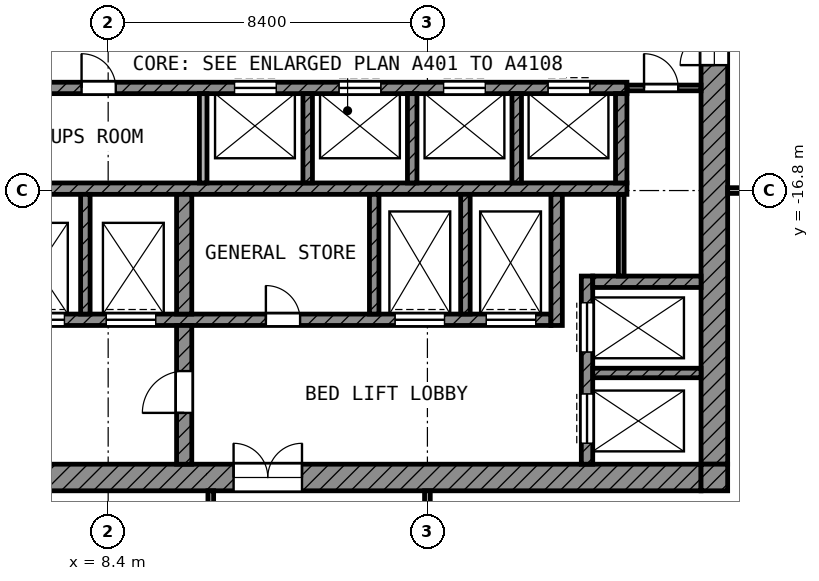
"""IFC4 building model, lengths in metres.
Left out: names, types, materials, properties, quantities, classifications, styles, units other than length and angle.
Written with IfcOpenShell. Run it as: python <this file> out.ifc"""

import sys

from ifc_helpers import new_model, si_unit, direction, frame, frame_2d, origin, place, context, subcontext, project, spatial, rectangle, extrude, element, fill, save


model = new_model("IFC4")
c1 = context("Model", 3, precision=1e-05, world=origin(), true_north=direction((0.0, 1.0)))
c2 = subcontext(c1, "Body", "Model", "MODEL_VIEW")
j1 = project(units=[si_unit("LENGTHUNIT", "METRE"), si_unit("PLANEANGLEUNIT", "RADIAN")], contexts=[c1])
p1 = place(None, origin())
s1 = spatial("IfcSite", under=j1, at=p1, CompositionType="ELEMENT")
p2 = place(p1, origin())
s2 = spatial("IfcBuilding", under=s1, at=p2, CompositionType="ELEMENT")
p3 = place(p2, frame((0.0, 0.0, 294.4)))
s3 = spatial("IfcBuildingStorey", under=s2, at=p3, CompositionType="ELEMENT", Elevation=294.4)
p4 = place(p3, frame((24.35, -24.0, 0.0), z_axis=(0.0, 0.0, 1.0), x_axis=(0.0, 1.0, 0.0)))
e1 = element("IfcWall", 1, at=p4, inside=s3, PredefinedType="SHEAR", context=c2, shape_type="SweptSolid", body=[
    extrude(rectangle(XDim=18.6, YDim=0.7, at=frame_2d((9.3, 0.0))), origin(), (0.0, 0.0, 1.0), 3.6),
])
p5 = place(p4, frame((10.5, 0.0, 0.0)))
e2 = element("IfcOpeningElement", 2, at=p5, cuts=e1, PredefinedType="OPENING", context=c2, shape_type="SweptSolid", body=[
    extrude(rectangle(XDim=1.8, YDim=2.1, at=frame_2d((0.9, 1.05))), frame((0.0, 0.36, 0.0), z_axis=(0.0, -1.0, 0.0), x_axis=(1.0, 0.0, 0.0)), (0.0, 0.0, 1.0), 0.72),
])
p6 = place(p3, frame((5.4, -24.35, 0.0), z_axis=(0.0, 0.0, 1.0), x_axis=(1.0, 0.0, 0.0)))
e3 = element("IfcWall", 3, at=p6, inside=s3, PredefinedType="SHEAR", context=c2, shape_type="SweptSolid", body=[
    extrude(rectangle(XDim=18.6, YDim=0.7, at=frame_2d((9.3, 0.0))), origin(), (0.0, 0.0, 1.0), 3.6),
])
p7 = place(p6, frame((6.3, 0.0, 0.0)))
e4 = element("IfcOpeningElement", 4, at=p7, cuts=e3, PredefinedType="OPENING", context=c2, shape_type="SweptSolid", body=[
    extrude(rectangle(XDim=1.8, YDim=2.1, at=frame_2d((0.9, 1.05))), frame((0.0, 0.36, 0.0), z_axis=(0.0, -1.0, 0.0), x_axis=(1.0, 0.0, 0.0)), (0.0, 0.0, 1.0), 0.72),
])
p8 = place(p3, frame((24.35, -24.7, 0.0), z_axis=(0.0, 0.0, 1.0), x_axis=(0.0, 1.0, 0.0)))
e5 = element("IfcWall", 5, at=p8, inside=s3, PredefinedType="SHEAR", context=c2, shape_type="SweptSolid", body=[
    extrude(rectangle(XDim=0.7, YDim=0.7, at=frame_2d((0.35, 0.0))), origin(), (0.0, 0.0, 1.0), 3.6),
])
p9 = place(p3, frame((5.4, -14.1, 0.0), z_axis=(0.0, 0.0, 1.0), x_axis=(1.0, 0.0, 0.0)))
e6 = element("IfcWall", 6, at=p9, inside=s3, PredefinedType="SHEAR", context=c2, shape_type="SweptSolid", body=[
    extrude(rectangle(XDim=16.65, YDim=0.3, at=frame_2d((8.325, 0.0))), origin(), (0.0, 0.0, 1.0), 3.6),
])
p10 = place(p9, frame((6.325, 0.0, 0.0)))
e7 = element("IfcOpeningElement", 7, at=p10, cuts=e6, PredefinedType="OPENING", context=c2, shape_type="SweptSolid", body=[
    extrude(rectangle(XDim=1.1, YDim=2.1, at=frame_2d((0.55, 1.05))), frame((0.0, 0.16, 0.0), z_axis=(0.0, -1.0, 0.0), x_axis=(1.0, 0.0, 0.0)), (0.0, 0.0, 1.0), 0.32),
])
p11 = place(p9, frame((9.075, 0.0, 0.0)))
e8 = element("IfcOpeningElement", 8, at=p11, cuts=e6, PredefinedType="OPENING", context=c2, shape_type="SweptSolid", body=[
    extrude(rectangle(XDim=1.1, YDim=2.1, at=frame_2d((0.55, 1.05))), frame((0.0, 0.16, 0.0), z_axis=(0.0, -1.0, 0.0), x_axis=(1.0, 0.0, 0.0)), (0.0, 0.0, 1.0), 0.32),
])
p12 = place(p9, frame((11.825, 0.0, 0.0)))
e9 = element("IfcOpeningElement", 9, at=p12, cuts=e6, PredefinedType="OPENING", context=c2, shape_type="SweptSolid", body=[
    extrude(rectangle(XDim=1.1, YDim=2.1, at=frame_2d((0.55, 1.05))), frame((0.0, 0.16, 0.0), z_axis=(0.0, -1.0, 0.0), x_axis=(1.0, 0.0, 0.0)), (0.0, 0.0, 1.0), 0.32),
])
p13 = place(p9, frame((14.575, 0.0, 0.0)))
e10 = element("IfcOpeningElement", 10, at=p13, cuts=e6, PredefinedType="OPENING", context=c2, shape_type="SweptSolid", body=[
    extrude(rectangle(XDim=1.1, YDim=2.1, at=frame_2d((0.55, 1.05))), frame((0.0, 0.16, 0.0), z_axis=(0.0, -1.0, 0.0), x_axis=(1.0, 0.0, 0.0)), (0.0, 0.0, 1.0), 0.32),
])
p14 = place(p9, frame((2.3, 0.0, 0.0)))
e11 = element("IfcOpeningElement", 11, at=p14, cuts=e6, PredefinedType="OPENING", context=c2, shape_type="SweptSolid", body=[
    extrude(rectangle(XDim=0.9, YDim=2.1, at=frame_2d((0.45, 1.05))), frame((0.0, 0.16, 0.0), z_axis=(0.0, -1.0, 0.0), x_axis=(1.0, 0.0, 0.0)), (0.0, 0.0, 1.0), 0.32),
])
p15 = place(p3, frame((5.4, -16.75, 0.0), z_axis=(0.0, 0.0, 1.0), x_axis=(1.0, 0.0, 0.0)))
e12 = element("IfcWall", 12, at=p15, inside=s3, PredefinedType="SHEAR", context=c2, shape_type="SweptSolid", body=[
    extrude(rectangle(XDim=16.65, YDim=0.3, at=frame_2d((8.325, 0.0))), origin(), (0.0, 0.0, 1.0), 3.6),
])
p16 = place(p3, frame((5.4, -20.2, 0.0), z_axis=(0.0, 0.0, 1.0), x_axis=(1.0, 0.0, 0.0)))
e13 = element("IfcWall", 13, at=p16, inside=s3, PredefinedType="SHEAR", context=c2, shape_type="SweptSolid", body=[
    extrude(rectangle(XDim=14.65, YDim=0.3, at=frame_2d((7.325, 0.0))), origin(), (0.0, 0.0, 1.0), 3.6),
])
p17 = place(p16, frame((10.55, 0.0, 0.0)))
e14 = element("IfcOpeningElement", 14, at=p17, cuts=e13, PredefinedType="OPENING", context=c2, shape_type="SweptSolid", body=[
    extrude(rectangle(XDim=1.3, YDim=2.1, at=frame_2d((0.65, 1.05))), frame((0.0, 0.16, 0.0), z_axis=(0.0, -1.0, 0.0), x_axis=(1.0, 0.0, 0.0)), (0.0, 0.0, 1.0), 0.32),
])
p18 = place(p16, frame((12.95, 0.0, 0.0)))
e15 = element("IfcOpeningElement", 15, at=p18, cuts=e13, PredefinedType="OPENING", context=c2, shape_type="SweptSolid", body=[
    extrude(rectangle(XDim=1.3, YDim=2.1, at=frame_2d((0.65, 1.05))), frame((0.0, 0.16, 0.0), z_axis=(0.0, -1.0, 0.0), x_axis=(1.0, 0.0, 0.0)), (0.0, 0.0, 1.0), 0.32),
])
p19 = place(p16, frame((0.55, 0.0, 0.0)))
e16 = element("IfcOpeningElement", 16, at=p19, cuts=e13, PredefinedType="OPENING", context=c2, shape_type="SweptSolid", body=[
    extrude(rectangle(XDim=1.3, YDim=2.1, at=frame_2d((0.65, 1.05))), frame((0.0, 0.16, 0.0), z_axis=(0.0, -1.0, 0.0), x_axis=(1.0, 0.0, 0.0)), (0.0, 0.0, 1.0), 0.32),
])
p20 = place(p16, frame((2.95, 0.0, 0.0)))
e17 = element("IfcOpeningElement", 17, at=p20, cuts=e13, PredefinedType="OPENING", context=c2, shape_type="SweptSolid", body=[
    extrude(rectangle(XDim=1.3, YDim=2.1, at=frame_2d((0.65, 1.05))), frame((0.0, 0.16, 0.0), z_axis=(0.0, -1.0, 0.0), x_axis=(1.0, 0.0, 0.0)), (0.0, 0.0, 1.0), 0.32),
])
p21 = place(p16, frame((7.15, 0.0, 0.0)))
e18 = element("IfcOpeningElement", 18, at=p21, cuts=e13, PredefinedType="OPENING", context=c2, shape_type="SweptSolid", body=[
    extrude(rectangle(XDim=0.9, YDim=2.1, at=frame_2d((0.45, 1.05))), frame((0.0, 0.16, 0.0), z_axis=(0.0, -1.0, 0.0), x_axis=(1.0, 0.0, 0.0)), (0.0, 0.0, 1.0), 0.32),
])
p22 = place(p3, frame((10.4, -24.0, 0.0), z_axis=(0.0, 0.0, 1.0), x_axis=(0.0, 1.0, 0.0)))
e19 = element("IfcWall", 19, at=p22, inside=s3, PredefinedType="SHEAR", context=c2, shape_type="SweptSolid", body=[
    extrude(rectangle(XDim=3.65, YDim=0.4, at=frame_2d((1.825, 0.0))), origin(), (0.0, 0.0, 1.0), 3.6),
])
p23 = place(p22, frame((1.35, 0.0, 0.0)))
e20 = element("IfcOpeningElement", 20, at=p23, cuts=e19, PredefinedType="OPENING", context=c2, shape_type="SweptSolid", body=[
    extrude(rectangle(XDim=1.1, YDim=2.1, at=frame_2d((0.55, 1.05))), frame((0.0, 0.21, 0.0), z_axis=(0.0, -1.0, 0.0), x_axis=(1.0, 0.0, 0.0)), (0.0, 0.0, 1.0), 0.42),
])
p24 = place(p3, frame((10.4, -20.05, 0.0), z_axis=(0.0, 0.0, 1.0), x_axis=(0.0, 1.0, 0.0)))
e21 = element("IfcWall", 21, at=p24, inside=s3, PredefinedType="SHEAR", context=c2, shape_type="SweptSolid", body=[
    extrude(rectangle(XDim=3.15, YDim=0.4, at=frame_2d((1.575, 0.0))), origin(), (0.0, 0.0, 1.0), 3.6),
])
p25 = place(p3, frame((20.2, -20.35, 0.0), z_axis=(0.0, 0.0, 1.0), x_axis=(0.0, 1.0, 0.0)))
e22 = element("IfcWall", 22, at=p25, inside=s3, PredefinedType="SHEAR", context=c2, shape_type="SweptSolid", body=[
    extrude(rectangle(XDim=3.45, YDim=0.3, at=frame_2d((1.725, 0.0))), origin(), (0.0, 0.0, 1.0), 3.6),
])
p26 = place(p3, frame((21.9, -16.6, 0.0), z_axis=(0.0, 0.0, 1.0), x_axis=(0.0, 1.0, 0.0)))
e23 = element("IfcWall", 23, at=p26, inside=s3, PredefinedType="SHEAR", context=c2, shape_type="SweptSolid", body=[
    extrude(rectangle(XDim=2.35, YDim=0.3, at=frame_2d((1.175, 0.0))), origin(), (0.0, 0.0, 1.0), 3.6),
])
p27 = place(p3, frame((21.15, -19.2, 0.0), z_axis=(0.0, 0.0, 1.0), x_axis=(1.0, 0.0, 0.0)))
e24 = element("IfcWall", 24, at=p27, inside=s3, PredefinedType="SHEAR", context=c2, shape_type="SweptSolid", body=[
    extrude(rectangle(XDim=2.85, YDim=0.3, at=frame_2d((1.425, 0.0))), origin(), (0.0, 0.0, 1.0), 3.6),
])
p28 = place(p3, frame((21.0, -24.0, 0.0), z_axis=(0.0, 0.0, 1.0), x_axis=(0.0, 1.0, 0.0)))
e25 = element("IfcWall", 25, at=p28, inside=s3, PredefinedType="SHEAR", context=c2, shape_type="SweptSolid", body=[
    extrude(rectangle(XDim=4.95, YDim=0.3, at=frame_2d((2.475, 0.0))), origin(), (0.0, 0.0, 1.0), 3.6),
])
p29 = place(p28, frame((2.95, 0.0, 0.0)))
e26 = element("IfcOpeningElement", 26, at=p29, cuts=e25, PredefinedType="OPENING", context=c2, shape_type="SweptSolid", body=[
    extrude(rectangle(XDim=1.3, YDim=2.1, at=frame_2d((0.65, 1.05))), frame((0.0, 0.16, 0.0), z_axis=(0.0, -1.0, 0.0), x_axis=(1.0, 0.0, 0.0)), (0.0, 0.0, 1.0), 0.32),
])
p30 = place(p28, frame((0.55, 0.0, 0.0)))
e27 = element("IfcOpeningElement", 27, at=p30, cuts=e25, PredefinedType="OPENING", context=c2, shape_type="SweptSolid", body=[
    extrude(rectangle(XDim=1.3, YDim=2.1, at=frame_2d((0.65, 1.05))), frame((0.0, 0.16, 0.0), z_axis=(0.0, -1.0, 0.0), x_axis=(1.0, 0.0, 0.0)), (0.0, 0.0, 1.0), 0.32),
])
p31 = place(p3, frame((21.15, -21.6, 0.0), z_axis=(0.0, 0.0, 1.0), x_axis=(1.0, 0.0, 0.0)))
e28 = element("IfcWall", 28, at=p31, inside=s3, PredefinedType="SHEAR", context=c2, shape_type="SweptSolid", body=[
    extrude(rectangle(XDim=2.85, YDim=0.25, at=frame_2d((1.425, 0.0))), origin(), (0.0, 0.0, 1.0), 3.6),
])
for number, where, z_axis, x_axis in (
    (29, (7.8, -20.05, 0.0), (0.0, 0.0, 1.0), (0.0, 1.0, 0.0)),
    (30, (15.4, -20.05, 0.0), (0.0, 0.0, 1.0), (0.0, 1.0, 0.0)),
    (31, (17.8, -20.05, 0.0), (0.0, 0.0, 1.0), (0.0, 1.0, 0.0)),
):
    element("IfcWall", number, at=place(p3, frame(where, z_axis=z_axis, x_axis=x_axis)), inside=s3, PredefinedType="SHEAR", context=c2, shape_type="SweptSolid", body=[
        extrude(rectangle(XDim=3.15, YDim=0.25, at=frame_2d((1.575, 0.0))), origin(), (0.0, 0.0, 1.0), 3.6),
    ])
p32 = place(p3, frame((10.9, -16.6, 0.0), z_axis=(0.0, 0.0, 1.0), x_axis=(0.0, 1.0, 0.0)))
e32 = element("IfcWall", 32, at=p32, inside=s3, PredefinedType="PARTITIONING", context=c2, shape_type="SweptSolid", body=[
    extrude(rectangle(XDim=2.35, YDim=0.2, at=frame_2d((1.175, 0.0))), origin(), (0.0, 0.0, 1.0), 3.6),
])
for number, where, z_axis, x_axis in (
    (33, (13.65, -16.6, 0.0), (0.0, 0.0, 1.0), (0.0, 1.0, 0.0)),
    (34, (16.4, -16.6, 0.0), (0.0, 0.0, 1.0), (0.0, 1.0, 0.0)),
    (35, (19.15, -16.6, 0.0), (0.0, 0.0, 1.0), (0.0, 1.0, 0.0)),
):
    element("IfcWall", number, at=place(p3, frame(where, z_axis=z_axis, x_axis=x_axis)), inside=s3, PredefinedType="SHEAR", context=c2, shape_type="SweptSolid", body=[
        extrude(rectangle(XDim=2.35, YDim=0.25, at=frame_2d((1.175, 0.0))), origin(), (0.0, 0.0, 1.0), 3.6),
    ])
p33 = place(p3, frame((21.9, -19.05, 0.0), z_axis=(0.0, 0.0, 1.0), x_axis=(0.0, 1.0, 0.0)))
e36 = element("IfcWall", 36, at=p33, inside=s3, PredefinedType="PARTITIONING", context=c2, shape_type="SweptSolid", body=[
    extrude(rectangle(XDim=2.15, YDim=0.15, at=frame_2d((1.075, 0.0))), origin(), (0.0, 0.0, 1.0), 3.6),
])
p34 = place(p3, frame((22.05, -14.1, 0.0), z_axis=(0.0, 0.0, 1.0), x_axis=(1.0, 0.0, 0.0)))
e37 = element("IfcWall", 37, at=p34, inside=s3, PredefinedType="PARTITIONING", context=c2, shape_type="SweptSolid", body=[
    extrude(rectangle(XDim=1.95, YDim=0.15, at=frame_2d((0.975, 0.0))), origin(), (0.0, 0.0, 1.0), 3.6),
])
p35 = place(p34, frame((0.45, 0.0, 0.0)))
e38 = element("IfcOpeningElement", 38, at=p35, cuts=e37, PredefinedType="OPENING", context=c2, shape_type="SweptSolid", body=[
    extrude(rectangle(XDim=0.9, YDim=2.1, at=frame_2d((0.45, 1.05))), frame((0.0, 0.085, 0.0), z_axis=(0.0, -1.0, 0.0), x_axis=(1.0, 0.0, 0.0)), (0.0, 0.0, 1.0), 0.17),
])
p36 = place(p3, frame((24.7, -16.8, 0.0), z_axis=(0.0, 0.0, 1.0), x_axis=(1.0, 0.0, 0.0)))
e39 = element("IfcWall", 39, at=p36, inside=s3, PredefinedType="PARTITIONING", context=c2, shape_type="SweptSolid", body=[
    extrude(rectangle(XDim=34.02, YDim=0.15, at=frame_2d((17.01, 0.0))), origin(), (0.0, 0.0, 1.0), 3.6),
])
p37 = place(p36, frame((1.85, 0.0, 0.0)))
e40 = element("IfcOpeningElement", 40, at=p37, cuts=e39, PredefinedType="OPENING", context=c2, shape_type="SweptSolid", body=[
    extrude(rectangle(XDim=1.5, YDim=2.1, at=frame_2d((0.75, 1.05))), frame((0.0, 0.085, 0.0), z_axis=(0.0, -1.0, 0.0), x_axis=(1.0, 0.0, 0.0)), (0.0, 0.0, 1.0), 0.17),
])
p38 = place(p36, frame((9.4, 0.0, 0.0)))
e41 = element("IfcOpeningElement", 41, at=p38, cuts=e39, PredefinedType="OPENING", context=c2, shape_type="SweptSolid", body=[
    extrude(rectangle(XDim=1.2, YDim=2.1, at=frame_2d((0.6, 1.05))), frame((0.0, 0.085, 0.0), z_axis=(0.0, -1.0, 0.0), x_axis=(1.0, 0.0, 0.0)), (0.0, 0.0, 1.0), 0.17),
])
p39 = place(p36, frame((19.8, 0.0, 0.0)))
e42 = element("IfcOpeningElement", 42, at=p39, cuts=e39, PredefinedType="OPENING", context=c2, shape_type="SweptSolid", body=[
    extrude(rectangle(XDim=1.2, YDim=2.1, at=frame_2d((0.6, 1.05))), frame((0.0, 0.085, 0.0), z_axis=(0.0, -1.0, 0.0), x_axis=(1.0, 0.0, 0.0)), (0.0, 0.0, 1.0), 0.17),
])
p40 = place(p36, frame((18.28, 0.0, 0.0)))
e43 = element("IfcOpeningElement", 43, at=p40, cuts=e39, PredefinedType="OPENING", context=c2, shape_type="SweptSolid", body=[
    extrude(rectangle(XDim=1.2, YDim=2.1, at=frame_2d((0.6, 1.05))), frame((0.0, 0.085, 0.0), z_axis=(0.0, -1.0, 0.0), x_axis=(1.0, 0.0, 0.0)), (0.0, 0.0, 1.0), 0.17),
])
p41 = place(p36, frame((24.0, 0.0, 0.0)))
e44 = element("IfcOpeningElement", 44, at=p41, cuts=e39, PredefinedType="OPENING", context=c2, shape_type="SweptSolid", body=[
    extrude(rectangle(XDim=1.2, YDim=2.1, at=frame_2d((0.6, 1.05))), frame((0.0, 0.085, 0.0), z_axis=(0.0, -1.0, 0.0), x_axis=(1.0, 0.0, 0.0)), (0.0, 0.0, 1.0), 0.17),
])
p42 = place(p36, frame((27.45, 0.0, 0.0)))
e45 = element("IfcOpeningElement", 45, at=p42, cuts=e39, PredefinedType="OPENING", context=c2, shape_type="SweptSolid", body=[
    extrude(rectangle(XDim=1.0, YDim=2.1, at=frame_2d((0.5, 1.05))), frame((0.0, 0.085, 0.0), z_axis=(0.0, -1.0, 0.0), x_axis=(1.0, 0.0, 0.0)), (0.0, 0.0, 1.0), 0.17),
])
p43 = place(p36, frame((31.65, 0.0, 0.0)))
e46 = element("IfcOpeningElement", 46, at=p43, cuts=e39, PredefinedType="OPENING", context=c2, shape_type="SweptSolid", body=[
    extrude(rectangle(XDim=1.0, YDim=2.1, at=frame_2d((0.5, 1.05))), frame((0.0, 0.085, 0.0), z_axis=(0.0, -1.0, 0.0), x_axis=(1.0, 0.0, 0.0)), (0.0, 0.0, 1.0), 0.17),
])
p44 = place(p3, frame((11.1, -29.399, 0.0), z_axis=(0.0, 0.0, 1.0), x_axis=(0.0, 1.0, 0.0)))
e47 = element("IfcWall", 47, at=p44, inside=s3, PredefinedType="PARTITIONING", context=c2, shape_type="SweptSolid", body=[
    extrude(rectangle(XDim=4.699, YDim=0.15, at=frame_2d((2.35, 0.0))), origin(), (0.0, 0.0, 1.0), 3.6),
])
p45 = place(p3, frame((16.8, -41.92, 0.0), z_axis=(0.0, 0.0, 1.0), x_axis=(0.0, 1.0, 0.0)))
e48 = element("IfcWall", 48, at=p45, inside=s3, PredefinedType="PARTITIONING", context=c2, shape_type="SweptSolid", body=[
    extrude(rectangle(XDim=17.22, YDim=0.15, at=frame_2d((8.61, 0.0))), origin(), (0.0, 0.0, 1.0), 3.6),
])
p46 = place(p45, frame((6.62, 0.0, 0.0)))
e49 = element("IfcOpeningElement", 49, at=p46, cuts=e48, PredefinedType="OPENING", context=c2, shape_type="SweptSolid", body=[
    extrude(rectangle(XDim=1.2, YDim=2.1, at=frame_2d((0.6, 1.05))), frame((0.0, 0.085, 0.0), z_axis=(0.0, -1.0, 0.0), x_axis=(1.0, 0.0, 0.0)), (0.0, 0.0, 1.0), 0.17),
])
p47 = place(p45, frame((1.22, 0.0, 0.0)))
e50 = element("IfcOpeningElement", 50, at=p47, cuts=e48, PredefinedType="OPENING", context=c2, shape_type="SweptSolid", body=[
    extrude(rectangle(XDim=1.0, YDim=2.1, at=frame_2d((0.5, 1.05))), frame((0.0, 0.085, 0.0), z_axis=(0.0, -1.0, 0.0), x_axis=(1.0, 0.0, 0.0)), (0.0, 0.0, 1.0), 0.17),
])
p48 = place(p10, origin())
e51 = element("IfcDoor", 51, at=p48, inside=s3, OperationType="DOUBLE_DOOR_SLIDING", PredefinedType="DOOR", context=c2, shape_type="SweptSolid", body=[
    extrude(rectangle(XDim=1.1, YDim=2.1, at=frame_2d((0.55, 1.05))), frame((0.0, 0.025, 0.0), z_axis=(0.0, -1.0, 0.0), x_axis=(1.0, 0.0, 0.0)), (0.0, 0.0, 1.0), 0.05),
])
fill(e7, e51)
p49 = place(p11, origin())
e52 = element("IfcDoor", 52, at=p49, inside=s3, OperationType="DOUBLE_DOOR_SLIDING", PredefinedType="DOOR", context=c2, shape_type="SweptSolid", body=[
    extrude(rectangle(XDim=1.1, YDim=2.1, at=frame_2d((0.55, 1.05))), frame((0.0, 0.025, 0.0), z_axis=(0.0, -1.0, 0.0), x_axis=(1.0, 0.0, 0.0)), (0.0, 0.0, 1.0), 0.05),
])
fill(e8, e52)
p50 = place(p12, origin())
e53 = element("IfcDoor", 53, at=p50, inside=s3, OperationType="DOUBLE_DOOR_SLIDING", PredefinedType="DOOR", context=c2, shape_type="SweptSolid", body=[
    extrude(rectangle(XDim=1.1, YDim=2.1, at=frame_2d((0.55, 1.05))), frame((0.0, 0.025, 0.0), z_axis=(0.0, -1.0, 0.0), x_axis=(1.0, 0.0, 0.0)), (0.0, 0.0, 1.0), 0.05),
])
fill(e9, e53)
p51 = place(p13, origin())
e54 = element("IfcDoor", 54, at=p51, inside=s3, OperationType="DOUBLE_DOOR_SLIDING", PredefinedType="DOOR", context=c2, shape_type="SweptSolid", body=[
    extrude(rectangle(XDim=1.1, YDim=2.1, at=frame_2d((0.55, 1.05))), frame((0.0, 0.025, 0.0), z_axis=(0.0, -1.0, 0.0), x_axis=(1.0, 0.0, 0.0)), (0.0, 0.0, 1.0), 0.05),
])
fill(e10, e54)
p52 = place(p29, origin())
e55 = element("IfcDoor", 55, at=p52, inside=s3, OperationType="DOUBLE_DOOR_SLIDING", PredefinedType="DOOR", context=c2, shape_type="SweptSolid", body=[
    extrude(rectangle(XDim=1.3, YDim=2.1, at=frame_2d((0.65, 1.05))), frame((0.0, 0.025, 0.0), z_axis=(0.0, -1.0, 0.0), x_axis=(1.0, 0.0, 0.0)), (0.0, 0.0, 1.0), 0.05),
])
fill(e26, e55)
p53 = place(p30, origin())
e56 = element("IfcDoor", 56, at=p53, inside=s3, OperationType="DOUBLE_DOOR_SLIDING", PredefinedType="DOOR", context=c2, shape_type="SweptSolid", body=[
    extrude(rectangle(XDim=1.3, YDim=2.1, at=frame_2d((0.65, 1.05))), frame((0.0, 0.025, 0.0), z_axis=(0.0, -1.0, 0.0), x_axis=(1.0, 0.0, 0.0)), (0.0, 0.0, 1.0), 0.05),
])
fill(e27, e56)
p54 = place(p17, origin())
e57 = element("IfcDoor", 57, at=p54, inside=s3, OperationType="DOUBLE_DOOR_SLIDING", PredefinedType="DOOR", context=c2, shape_type="SweptSolid", body=[
    extrude(rectangle(XDim=1.3, YDim=2.1, at=frame_2d((0.65, 1.05))), frame((0.0, 0.025, 0.0), z_axis=(0.0, -1.0, 0.0), x_axis=(1.0, 0.0, 0.0)), (0.0, 0.0, 1.0), 0.05),
])
fill(e14, e57)
p55 = place(p18, origin())
e58 = element("IfcDoor", 58, at=p55, inside=s3, OperationType="DOUBLE_DOOR_SLIDING", PredefinedType="DOOR", context=c2, shape_type="SweptSolid", body=[
    extrude(rectangle(XDim=1.3, YDim=2.1, at=frame_2d((0.65, 1.05))), frame((0.0, 0.025, 0.0), z_axis=(0.0, -1.0, 0.0), x_axis=(1.0, 0.0, 0.0)), (0.0, 0.0, 1.0), 0.05),
])
fill(e15, e58)
p56 = place(p19, origin())
e59 = element("IfcDoor", 59, at=p56, inside=s3, OperationType="DOUBLE_DOOR_SLIDING", PredefinedType="DOOR", context=c2, shape_type="SweptSolid", body=[
    extrude(rectangle(XDim=1.3, YDim=2.1, at=frame_2d((0.65, 1.05))), frame((0.0, 0.025, 0.0), z_axis=(0.0, -1.0, 0.0), x_axis=(1.0, 0.0, 0.0)), (0.0, 0.0, 1.0), 0.05),
])
fill(e16, e59)
p57 = place(p20, origin())
e60 = element("IfcDoor", 60, at=p57, inside=s3, OperationType="DOUBLE_DOOR_SLIDING", PredefinedType="DOOR", context=c2, shape_type="SweptSolid", body=[
    extrude(rectangle(XDim=1.3, YDim=2.1, at=frame_2d((0.65, 1.05))), frame((0.0, 0.025, 0.0), z_axis=(0.0, -1.0, 0.0), x_axis=(1.0, 0.0, 0.0)), (0.0, 0.0, 1.0), 0.05),
])
fill(e17, e60)
p58 = place(p23, origin())
e61 = element("IfcDoor", 61, at=p58, inside=s3, OperationType="SINGLE_SWING_LEFT", PredefinedType="DOOR", context=c2, shape_type="SweptSolid", body=[
    extrude(rectangle(XDim=1.1, YDim=2.1, at=frame_2d((0.55, 1.05))), frame((0.0, 0.025, 0.0), z_axis=(0.0, -1.0, 0.0), x_axis=(1.0, 0.0, 0.0)), (0.0, 0.0, 1.0), 0.05),
])
fill(e20, e61)
p59 = place(p5, origin())
e62 = element("IfcDoor", 62, at=p59, inside=s3, OperationType="DOUBLE_DOOR_SINGLE_SWING", PredefinedType="DOOR", context=c2, shape_type="SweptSolid", body=[
    extrude(rectangle(XDim=1.8, YDim=2.1, at=frame_2d((0.9, 1.05))), frame((0.0, 0.025, 0.0), z_axis=(0.0, -1.0, 0.0), x_axis=(1.0, 0.0, 0.0)), (0.0, 0.0, 1.0), 0.05),
])
fill(e2, e62)
p60 = place(p7, origin())
e63 = element("IfcDoor", 63, at=p60, inside=s3, OperationType="DOUBLE_DOOR_SINGLE_SWING", PredefinedType="DOOR", context=c2, shape_type="SweptSolid", body=[
    extrude(rectangle(XDim=1.8, YDim=2.1, at=frame_2d((0.9, 1.05))), frame((0.0, 0.025, 0.0), z_axis=(0.0, -1.0, 0.0), x_axis=(1.0, 0.0, 0.0)), (0.0, 0.0, 1.0), 0.05),
])
fill(e4, e63)
p61 = place(p35, origin())
e64 = element("IfcDoor", 64, at=p61, inside=s3, OperationType="SINGLE_SWING_LEFT", PredefinedType="DOOR", context=c2, shape_type="SweptSolid", body=[
    extrude(rectangle(XDim=0.9, YDim=2.1, at=frame_2d((0.45, 1.05))), frame((0.0, 0.025, 0.0), z_axis=(0.0, -1.0, 0.0), x_axis=(1.0, 0.0, 0.0)), (0.0, 0.0, 1.0), 0.05),
])
fill(e38, e64)
p62 = place(p21, origin())
e65 = element("IfcDoor", 65, at=p62, inside=s3, OperationType="SINGLE_SWING_LEFT", PredefinedType="DOOR", context=c2, shape_type="SweptSolid", body=[
    extrude(rectangle(XDim=0.9, YDim=2.1, at=frame_2d((0.45, 1.05))), frame((0.0, 0.025, 0.0), z_axis=(0.0, -1.0, 0.0), x_axis=(1.0, 0.0, 0.0)), (0.0, 0.0, 1.0), 0.05),
])
fill(e18, e65)
p63 = place(p14, origin())
e66 = element("IfcDoor", 66, at=p63, inside=s3, OperationType="SINGLE_SWING_LEFT", PredefinedType="DOOR", context=c2, shape_type="SweptSolid", body=[
    extrude(rectangle(XDim=0.9, YDim=2.1, at=frame_2d((0.45, 1.05))), frame((0.0, 0.025, 0.0), z_axis=(0.0, -1.0, 0.0), x_axis=(1.0, 0.0, 0.0)), (0.0, 0.0, 1.0), 0.05),
])
fill(e11, e66)
save(model, sys.argv[1])
